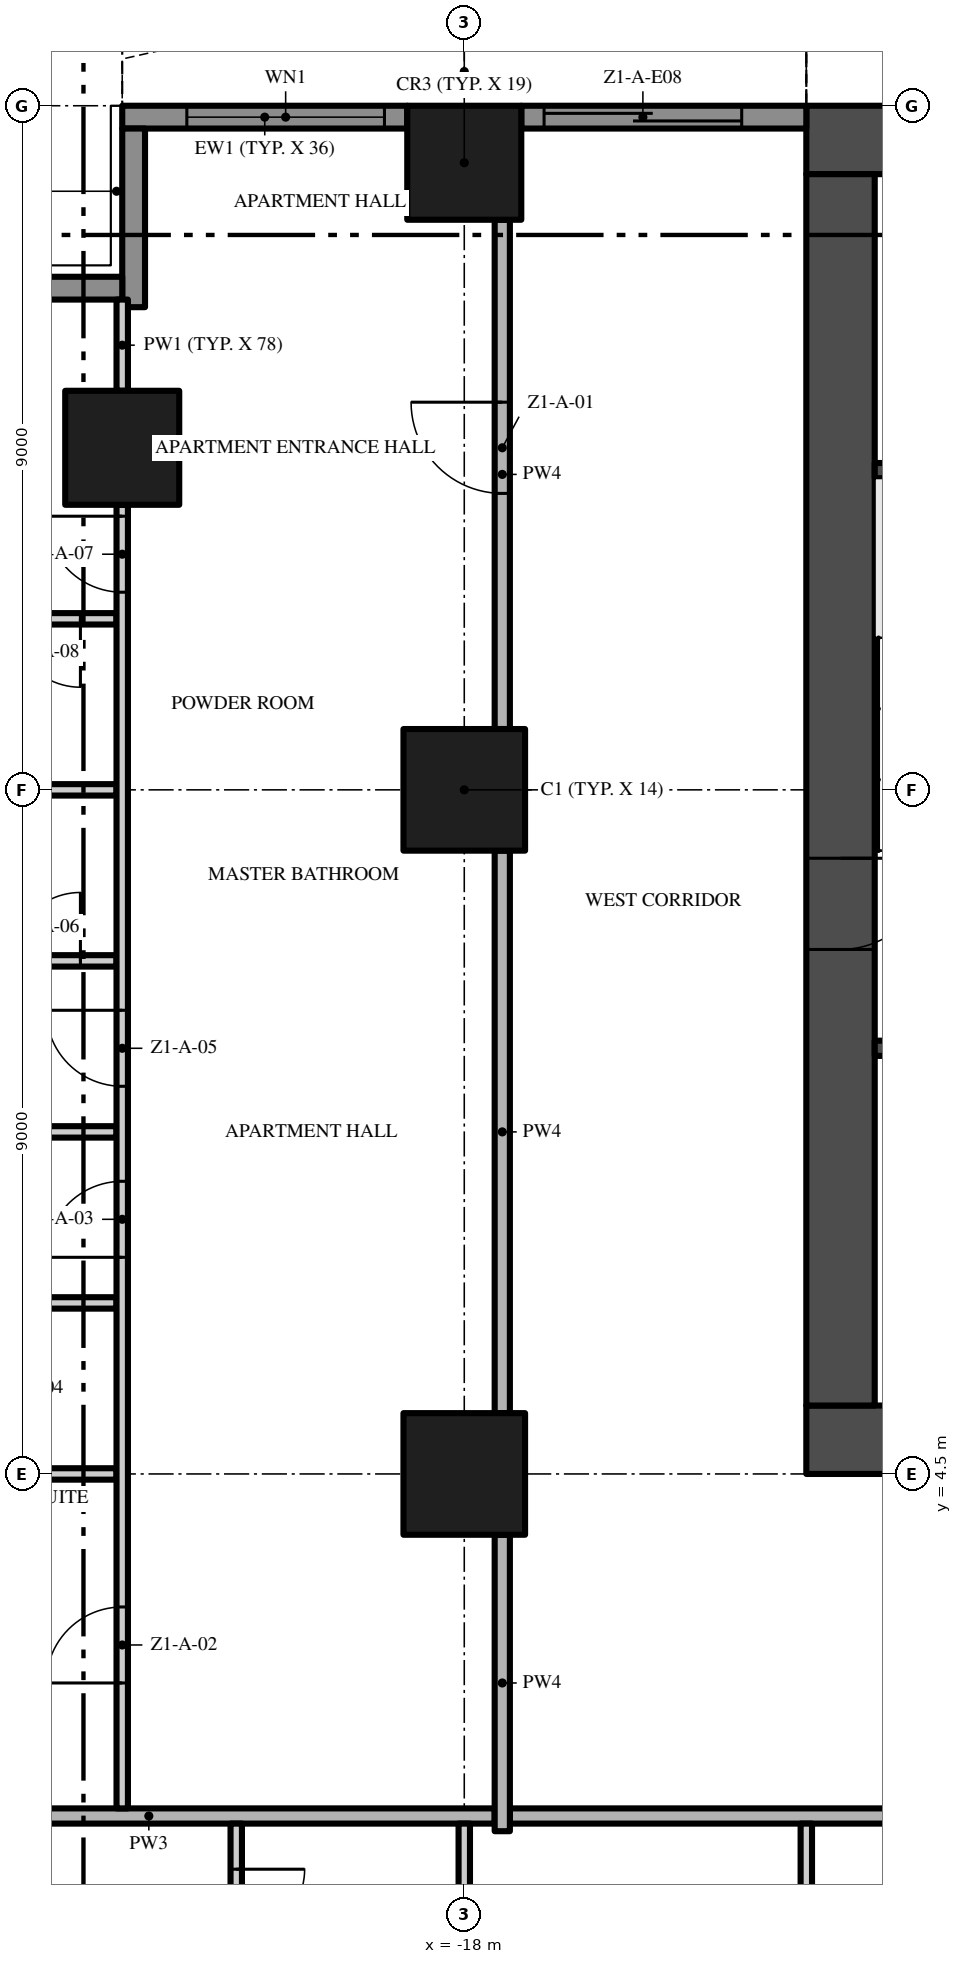
"""IFC4 building model, lengths in metres.
Left out: names, types, materials, properties, quantities, classifications, styles, units other than length and angle.
Written with IfcOpenShell. Run it as: python <this file> out.ifc"""

import sys

from ifc_helpers import new_model, si_unit, direction, frame, frame_2d, origin, origin_2d, place, context, subcontext, project, spatial, polyline, rectangle, outline, extrude, element, fill, save


model = new_model("IFC4")
c1 = context("Model", 3, precision=1e-05, world=origin(), true_north=direction((0.0, 1.0)))
c2 = subcontext(c1, "Body", "Model", "MODEL_VIEW")
j1 = project(units=[si_unit("LENGTHUNIT", "METRE"), si_unit("PLANEANGLEUNIT", "RADIAN")], contexts=[c1])
p1 = place(None, origin())
s1 = spatial("IfcSite", under=j1, at=p1, CompositionType="ELEMENT")
p2 = place(p1, origin())
s2 = spatial("IfcBuilding", under=s1, at=p2, CompositionType="ELEMENT")
p3 = place(p2, frame((0.0, 0.0, 18.8)))
s3 = spatial("IfcBuildingStorey", under=s2, at=p3, CompositionType="ELEMENT", Elevation=18.8)
p4 = place(p3, frame((-13.5, 4.95, -0.3), z_axis=(0.0, 0.0, 1.0), x_axis=(1.0, 0.0, 0.0)))
e1 = element("IfcWall", 1, at=p4, inside=s3, PredefinedType="SHEAR", context=c2, shape_type="SweptSolid", body=[
    extrude(rectangle(XDim=27.0, YDim=0.9, at=frame_2d((13.5, 0.0))), origin(), (0.0, 0.0, 1.0), 3.8),
])
p5 = place(p4, frame((12.0, 0.0, 0.3)))
e2 = element("IfcOpeningElement", 2, at=p5, cuts=e1, PredefinedType="OPENING", context=c2, shape_type="SweptSolid", body=[
    extrude(rectangle(XDim=3.0, YDim=2.4, at=frame_2d((1.5, 1.2))), frame((0.0, 0.46, 0.0), z_axis=(0.0, -1.0, 0.0), x_axis=(1.0, 0.0, 0.0)), (0.0, 0.0, 1.0), 0.92),
])
p6 = place(p4, frame((4.9, 0.0, 0.3)))
e3 = element("IfcOpeningElement", 3, at=p6, cuts=e1, PredefinedType="OPENING", context=c2, shape_type="SweptSolid", body=[
    extrude(rectangle(XDim=1.2, YDim=2.2, at=frame_2d((0.6, 1.1))), frame((0.0, 0.46, 0.0), z_axis=(0.0, -1.0, 0.0), x_axis=(1.0, 0.0, 0.0)), (0.0, 0.0, 1.0), 0.92),
])
p7 = place(p4, frame((20.75, 0.0, 0.3)))
e4 = element("IfcOpeningElement", 4, at=p7, cuts=e1, PredefinedType="OPENING", context=c2, shape_type="SweptSolid", body=[
    extrude(rectangle(XDim=1.5, YDim=2.2, at=frame_2d((0.75, 1.1))), frame((0.0, 0.46, 0.0), z_axis=(0.0, -1.0, 0.0), x_axis=(1.0, 0.0, 0.0)), (0.0, 0.0, 1.0), 0.92),
])
p8 = place(p4, frame((17.4, 0.0, 0.3)))
e5 = element("IfcOpeningElement", 5, at=p8, cuts=e1, PredefinedType="OPENING", context=c2, shape_type="SweptSolid", body=[
    extrude(rectangle(XDim=1.2, YDim=2.2, at=frame_2d((0.6, 1.1))), frame((0.0, 0.46, 0.0), z_axis=(0.0, -1.0, 0.0), x_axis=(1.0, 0.0, 0.0)), (0.0, 0.0, 1.0), 0.92),
])
p9 = place(p3, frame((13.5, 22.05, -0.3), z_axis=(0.0, 0.0, 1.0), x_axis=(-1.0, 0.0, 0.0)))
e6 = element("IfcWall", 6, at=p9, inside=s3, PredefinedType="SHEAR", context=c2, shape_type="SweptSolid", body=[
    extrude(rectangle(XDim=27.0, YDim=0.9, at=frame_2d((13.5, 0.0))), origin(), (0.0, 0.0, 1.0), 3.8),
])
p10 = place(p3, frame((-13.05, 21.6, -0.3), z_axis=(0.0, 0.0, 1.0), x_axis=(0.0, -1.0, 0.0)))
e7 = element("IfcWall", 7, at=p10, inside=s3, PredefinedType="SHEAR", context=c2, shape_type="SweptSolid", body=[
    extrude(rectangle(XDim=16.2, YDim=0.9, at=frame_2d((8.1, 0.0))), origin(), (0.0, 0.0, 1.0), 3.8),
])
p11 = place(p10, frame((9.0, 0.0, 0.3)))
e8 = element("IfcOpeningElement", 8, at=p11, cuts=e7, PredefinedType="OPENING", context=c2, shape_type="SweptSolid", body=[
    extrude(rectangle(XDim=1.2, YDim=2.2, at=frame_2d((0.6, 1.1))), frame((0.0, 0.46, 0.0), z_axis=(0.0, -1.0, 0.0), x_axis=(1.0, 0.0, 0.0)), (0.0, 0.0, 1.0), 0.92),
])
p12 = place(p3, frame((-18.0, 13.5, 0.0), z_axis=(0.0, 0.0, 1.0), x_axis=(1.0, 0.0, 0.0)))
e9 = element("IfcColumn", 9, at=p12, inside=s3, PredefinedType="COLUMN", context=c2, shape_type="SweptSolid", body=[
    extrude(rectangle(XDim=1.6, YDim=1.6, at=origin_2d()), origin(), (0.0, 0.0, 1.0), 3.5),
])
p13 = place(p3, frame((-18.0, 21.75, 0.0), z_axis=(0.0, 0.0, 1.0), x_axis=(1.0, 0.0, 0.0)))
e10 = element("IfcColumn", 10, at=p13, inside=s3, PredefinedType="COLUMN", context=c2, shape_type="SweptSolid", body=[
    extrude(rectangle(XDim=1.5, YDim=1.5, at=origin_2d()), origin(), (0.0, 0.0, 1.0), 3.5),
])
p14 = place(p3, frame((-18.0, 4.5, 0.0), z_axis=(0.0, 0.0, 1.0), x_axis=(1.0, 0.0, 0.0)))
e11 = element("IfcColumn", 11, at=p14, inside=s3, PredefinedType="COLUMN", context=c2, shape_type="SweptSolid", body=[
    extrude(rectangle(XDim=1.6, YDim=1.6, at=origin_2d()), origin(), (0.0, 0.0, 1.0), 3.5),
])
p15 = place(p3, frame((-22.5, 18.0, 0.0), z_axis=(0.0, 0.0, 1.0), x_axis=(1.0, 0.0, 0.0)))
e12 = element("IfcColumn", 12, at=p15, inside=s3, PredefinedType="COLUMN", context=c2, shape_type="SweptSolid", body=[
    extrude(rectangle(XDim=1.5, YDim=1.5, at=origin_2d()), origin(), (0.0, 0.0, 1.0), 3.5),
])
p16 = place(p3, frame((-17.25, 22.35, 0.0), z_axis=(0.0, 0.0, 1.0), x_axis=(1.0, 0.0, 0.0)))
e13 = element("IfcWall", 13, at=p16, inside=s3, PredefinedType="SOLIDWALL", context=c2, shape_type="SweptSolid", body=[
    extrude(rectangle(XDim=3.75, YDim=0.3, at=frame_2d((1.875, 0.0))), origin(), (0.0, 0.0, 1.0), 3.5),
])
p17 = place(p16, frame((0.3, 0.0, 0.0)))
e14 = element("IfcOpeningElement", 14, at=p17, cuts=e13, PredefinedType="OPENING", context=c2, shape_type="SweptSolid", body=[
    extrude(rectangle(XDim=2.6, YDim=2.4, at=frame_2d((1.3, 1.2))), frame((0.0, 0.16, 0.0), z_axis=(0.0, -1.0, 0.0), x_axis=(1.0, 0.0, 0.0)), (0.0, 0.0, 1.0), 0.32),
])
p18 = place(p3, frame((-22.5, 22.35, 0.0), z_axis=(0.0, 0.0, 1.0), x_axis=(1.0, 0.0, 0.0)))
e15 = element("IfcWall", 15, at=p18, inside=s3, PredefinedType="SOLIDWALL", context=c2, shape_type="SweptSolid", body=[
    extrude(rectangle(XDim=3.75, YDim=0.3, at=frame_2d((1.875, 0.0))), origin(), (0.0, 0.0, 1.0), 3.5),
])
p19 = place(p18, frame((0.85, 0.0, 0.45)))
e16 = element("IfcOpeningElement", 16, at=p19, cuts=e15, PredefinedType="OPENING", context=c2, shape_type="SweptSolid", body=[
    extrude(rectangle(XDim=2.6, YDim=2.65, at=frame_2d((1.3, 1.325))), frame((0.0, 0.16, 0.0), z_axis=(0.0, -1.0, 0.0), x_axis=(1.0, 0.0, 0.0)), (0.0, 0.0, 1.0), 0.32),
])
p20 = place(p3, frame((-22.35, 19.85, 0.0), z_axis=(0.0, 0.0, 1.0), x_axis=(0.0, 1.0, 0.0)))
e17 = element("IfcWall", 17, at=p20, inside=s3, PredefinedType="SOLIDWALL", context=c2, shape_type="SweptSolid", body=[
    extrude(rectangle(XDim=2.35, YDim=0.3, at=frame_2d((1.175, 0.0))), origin(), (0.0, 0.0, 1.0), 3.5),
])
p21 = place(p3, frame((-24.75, 20.1, 0.0), z_axis=(0.0, 0.0, 1.0), x_axis=(1.0, 0.0, 0.0)))
e18 = element("IfcWall", 18, at=p21, inside=s3, PredefinedType="SOLIDWALL", context=c2, shape_type="SweptSolid", body=[
    extrude(rectangle(XDim=2.25, YDim=0.3, at=frame_2d((1.125, 0.0))), origin(), (0.0, 0.0, 1.0), 3.5),
])
p22 = place(p3, origin())
e19 = element("IfcWall", 19, at=p22, inside=s3, PredefinedType="USERDEFINED", context=c2, shape_type="SweptSolid", body=[
    extrude(outline(polyline([(-13.5, 25.149), (-15.0, 25.485), (-15.375, 25.5), (-16.5, 25.369), (-18.0, 24.845), (-19.5, 24.112), (-21.0, 23.451), (-22.5, 23.115), (-22.445, 22.871), (-20.921, 23.213), (-19.395, 23.885), (-17.904, 24.614), (-16.444, 25.124), (-15.365, 25.249), (-15.033, 25.236), (-13.555, 24.905), (-13.5, 25.149)])), origin(), (0.0, 0.0, 1.0), 0.9),
])
for number, where, z_axis, x_axis in (
    (20, (-12.6, 10.1, 0.0), (0.0, 0.0, 1.0), (1.0, 0.0, 0.0)),
    (21, (-12.6, 17.7, 0.0), (0.0, 0.0, 1.0), (1.0, 0.0, 0.0)),
):
    element("IfcWall", number, at=place(p3, frame(where, z_axis=z_axis, x_axis=x_axis)), inside=s3, PredefinedType="SHEAR", context=c2, shape_type="SweptSolid", body=[
        extrude(rectangle(XDim=2.95, YDim=0.2, at=frame_2d((1.475, 0.0))), origin(), (0.0, 0.0, 1.0), 3.5),
    ])
p23 = place(p3, frame((-17.4, 0.0, 0.0), z_axis=(0.0, 0.0, 1.0), x_axis=(1.0, 0.0, 0.0)))
e22 = element("IfcWall", 22, at=p23, inside=s3, PredefinedType="PARTITIONING", context=c2, shape_type="SweptSolid", body=[
    extrude(rectangle(XDim=12.8, YDim=0.2, at=frame_2d((6.4, 0.0))), origin(), (0.0, 0.0, 1.0), 3.5),
])
p24 = place(p3, frame((-26.7, 0.0, 0.0), z_axis=(0.0, 0.0, 1.0), x_axis=(1.0, 0.0, 0.0)))
e23 = element("IfcWall", 23, at=p24, inside=s3, PredefinedType="PARTITIONING", context=c2, shape_type="SweptSolid", body=[
    extrude(rectangle(XDim=9.1, YDim=0.2, at=frame_2d((4.55, 0.0))), origin(), (0.0, 0.0, 1.0), 3.5),
])
p25 = place(p3, frame((-25.5, 4.5, 0.0), z_axis=(0.0, 0.0, 1.0), x_axis=(1.0, 0.0, 0.0)))
e24 = element("IfcWall", 24, at=p25, inside=s3, PredefinedType="PARTITIONING", context=c2, shape_type="SweptSolid", body=[
    extrude(rectangle(XDim=2.925, YDim=0.15, at=frame_2d((1.462, 0.0))), origin(), (0.0, 0.0, 1.0), 3.5),
])
p26 = place(p3, frame((-24.45, 6.75, 0.0), z_axis=(0.0, 0.0, 1.0), x_axis=(1.0, 0.0, 0.0)))
e25 = element("IfcWall", 25, at=p26, inside=s3, PredefinedType="PARTITIONING", context=c2, shape_type="SweptSolid", body=[
    extrude(rectangle(XDim=1.875, YDim=0.15, at=frame_2d((0.938, 0.0))), origin(), (0.0, 0.0, 1.0), 3.5),
])
p27 = place(p3, frame((-26.7, 9.0, 0.0), z_axis=(0.0, 0.0, 1.0), x_axis=(1.0, 0.0, 0.0)))
e26 = element("IfcWall", 26, at=p27, inside=s3, PredefinedType="PARTITIONING", context=c2, shape_type="SweptSolid", body=[
    extrude(rectangle(XDim=4.125, YDim=0.15, at=frame_2d((2.062, 0.0))), origin(), (0.0, 0.0, 1.0), 3.5),
])
p28 = place(p3, frame((-24.45, 11.25, 0.0), z_axis=(0.0, 0.0, 1.0), x_axis=(1.0, 0.0, 0.0)))
e27 = element("IfcWall", 27, at=p28, inside=s3, PredefinedType="PARTITIONING", context=c2, shape_type="SweptSolid", body=[
    extrude(rectangle(XDim=1.875, YDim=0.15, at=frame_2d((0.938, 0.0))), origin(), (0.0, 0.0, 1.0), 3.5),
])
p29 = place(p28, frame((0.5, 0.0, 0.0)))
e28 = element("IfcOpeningElement", 28, at=p29, cuts=e27, PredefinedType="OPENING", context=c2, shape_type="SweptSolid", body=[
    extrude(rectangle(XDim=0.9, YDim=2.1, at=frame_2d((0.45, 1.05))), frame((0.0, 0.085, 0.0), z_axis=(0.0, -1.0, 0.0), x_axis=(1.0, 0.0, 0.0)), (0.0, 0.0, 1.0), 0.17),
])
p30 = place(p3, frame((-24.45, 13.5, 0.0), z_axis=(0.0, 0.0, 1.0), x_axis=(1.0, 0.0, 0.0)))
e29 = element("IfcWall", 29, at=p30, inside=s3, PredefinedType="PARTITIONING", context=c2, shape_type="SweptSolid", body=[
    extrude(rectangle(XDim=1.875, YDim=0.15, at=frame_2d((0.938, 0.0))), origin(), (0.0, 0.0, 1.0), 3.5),
])
p31 = place(p3, frame((-22.575, 15.75, 0.0), z_axis=(0.0, 0.0, 1.0), x_axis=(-1.0, 0.0, 0.0)))
e30 = element("IfcWall", 30, at=p31, inside=s3, PredefinedType="PARTITIONING", context=c2, shape_type="SweptSolid", body=[
    extrude(rectangle(XDim=1.875, YDim=0.15, at=frame_2d((0.938, 0.0))), origin(), (0.0, 0.0, 1.0), 3.5),
])
p32 = place(p31, frame((0.475, 0.0, 0.0)))
e31 = element("IfcOpeningElement", 31, at=p32, cuts=e30, PredefinedType="OPENING", context=c2, shape_type="SweptSolid", body=[
    extrude(rectangle(XDim=0.9, YDim=2.1, at=frame_2d((0.45, 1.05))), frame((0.0, 0.085, 0.0), z_axis=(0.0, -1.0, 0.0), x_axis=(1.0, 0.0, 0.0)), (0.0, 0.0, 1.0), 0.17),
])
p33 = place(p3, frame((-22.5, 0.1, 0.0), z_axis=(0.0, 0.0, 1.0), x_axis=(0.0, 1.0, 0.0)))
e32 = element("IfcWall", 32, at=p33, inside=s3, PredefinedType="PARTITIONING", context=c2, shape_type="SweptSolid", body=[
    extrude(rectangle(XDim=17.15, YDim=0.15, at=frame_2d((8.575, 0.0))), origin(), (0.0, 0.0, 1.0), 3.5),
])
p34 = place(p33, frame((1.65, 0.0, 0.0)))
e33 = element("IfcOpeningElement", 33, at=p34, cuts=e32, PredefinedType="OPENING", context=c2, shape_type="SweptSolid", body=[
    extrude(rectangle(XDim=1.0, YDim=2.4, at=frame_2d((0.5, 1.2))), frame((0.0, 0.085, 0.0), z_axis=(0.0, -1.0, 0.0), x_axis=(1.0, 0.0, 0.0)), (0.0, 0.0, 1.0), 0.17),
])
p35 = place(p33, frame((7.25, 0.0, 0.0)))
e34 = element("IfcOpeningElement", 34, at=p35, cuts=e32, PredefinedType="OPENING", context=c2, shape_type="SweptSolid", body=[
    extrude(rectangle(XDim=1.0, YDim=2.4, at=frame_2d((0.5, 1.2))), frame((0.0, 0.085, 0.0), z_axis=(0.0, -1.0, 0.0), x_axis=(1.0, 0.0, 0.0)), (0.0, 0.0, 1.0), 0.17),
])
p36 = place(p33, frame((9.5, 0.0, 0.0)))
e35 = element("IfcOpeningElement", 35, at=p36, cuts=e32, PredefinedType="OPENING", context=c2, shape_type="SweptSolid", body=[
    extrude(rectangle(XDim=1.0, YDim=2.4, at=frame_2d((0.5, 1.2))), frame((0.0, 0.085, 0.0), z_axis=(0.0, -1.0, 0.0), x_axis=(1.0, 0.0, 0.0)), (0.0, 0.0, 1.0), 0.17),
])
p37 = place(p33, frame((16.0, 0.0, 0.0)))
e36 = element("IfcOpeningElement", 36, at=p37, cuts=e32, PredefinedType="OPENING", context=c2, shape_type="SweptSolid", body=[
    extrude(rectangle(XDim=1.0, YDim=2.4, at=frame_2d((0.5, 1.2))), frame((0.0, 0.085, 0.0), z_axis=(0.0, -1.0, 0.0), x_axis=(1.0, 0.0, 0.0)), (0.0, 0.0, 1.0), 0.17),
])
p38 = place(p3, frame((-22.5, 18.75, 0.0), z_axis=(0.0, 0.0, 1.0), x_axis=(0.0, 1.0, 0.0)))
e37 = element("IfcWall", 37, at=p38, inside=s3, PredefinedType="PARTITIONING", context=c2, shape_type="SweptSolid", body=[
    extrude(rectangle(XDim=1.2, YDim=0.15, at=frame_2d((0.6, 0.0))), origin(), (0.0, 0.0, 1.0), 3.5),
])
p39 = place(p3, frame((-21.0, -0.1, 0.0), z_axis=(0.0, 0.0, 1.0), x_axis=(0.0, -1.0, 0.0)))
e38 = element("IfcWall", 38, at=p39, inside=s3, PredefinedType="PARTITIONING", context=c2, shape_type="SweptSolid", body=[
    extrude(rectangle(XDim=2.225, YDim=0.15, at=frame_2d((1.113, 0.0))), origin(), (0.0, 0.0, 1.0), 3.5),
])
p40 = place(p39, frame((0.6, 0.0, 0.0)))
e39 = element("IfcOpeningElement", 39, at=p40, cuts=e38, PredefinedType="OPENING", context=c2, shape_type="SweptSolid", body=[
    extrude(rectangle(XDim=0.9, YDim=2.1, at=frame_2d((0.45, 1.05))), frame((0.0, 0.085, 0.0), z_axis=(0.0, -1.0, 0.0), x_axis=(1.0, 0.0, 0.0)), (0.0, 0.0, 1.0), 0.17),
])
p41 = place(p3, frame((-18.0, -3.7, 0.0), z_axis=(0.0, 0.0, 1.0), x_axis=(0.0, 1.0, 0.0)))
e40 = element("IfcWall", 40, at=p41, inside=s3, PredefinedType="PARTITIONING", context=c2, shape_type="SweptSolid", body=[
    extrude(rectangle(XDim=3.6, YDim=0.15, at=frame_2d((1.8, 0.0))), origin(), (0.0, 0.0, 1.0), 3.5),
])
p42 = place(p3, frame((-17.5, -0.2, 0.0), z_axis=(0.0, 0.0, 1.0), x_axis=(0.0, 1.0, 0.0)))
e41 = element("IfcWall", 41, at=p42, inside=s3, PredefinedType="PARTITIONING", context=c2, shape_type="SweptSolid", body=[
    extrude(rectangle(XDim=3.9, YDim=0.2, at=frame_2d((1.95, 0.0))), origin(), (0.0, 0.0, 1.0), 3.5),
])
p43 = place(p3, frame((-17.5, 5.3, 0.0), z_axis=(0.0, 0.0, 1.0), x_axis=(0.0, 1.0, 0.0)))
e42 = element("IfcWall", 42, at=p43, inside=s3, PredefinedType="PARTITIONING", context=c2, shape_type="SweptSolid", body=[
    extrude(rectangle(XDim=7.4, YDim=0.2, at=frame_2d((3.7, 0.0))), origin(), (0.0, 0.0, 1.0), 3.5),
])
p44 = place(p3, frame((-17.5, 14.3, 0.0), z_axis=(0.0, 0.0, 1.0), x_axis=(0.0, 1.0, 0.0)))
e43 = element("IfcWall", 43, at=p44, inside=s3, PredefinedType="PARTITIONING", context=c2, shape_type="SweptSolid", body=[
    extrude(rectangle(XDim=6.7, YDim=0.2, at=frame_2d((3.35, 0.0))), origin(), (0.0, 0.0, 1.0), 3.5),
])
p45 = place(p44, frame((3.1, 0.0, 0.0)))
e44 = element("IfcOpeningElement", 44, at=p45, cuts=e43, PredefinedType="OPENING", context=c2, shape_type="SweptSolid", body=[
    extrude(rectangle(XDim=1.2, YDim=2.4, at=frame_2d((0.6, 1.2))), frame((0.0, 0.11, 0.0), z_axis=(0.0, -1.0, 0.0), x_axis=(1.0, 0.0, 0.0)), (0.0, 0.0, 1.0), 0.22),
])
p46 = place(p3, frame((-13.5, -9.975, 0.0), z_axis=(0.0, 0.0, 1.0), x_axis=(0.0, 1.0, 0.0)))
e45 = element("IfcWall", 45, at=p46, inside=s3, PredefinedType="PARTITIONING", context=c2, shape_type="SweptSolid", body=[
    extrude(rectangle(XDim=9.875, YDim=0.15, at=frame_2d((4.938, 0.0))), origin(), (0.0, 0.0, 1.0), 3.5),
])
p47 = place(p17, origin())
e46 = element("IfcDoor", 46, at=p47, inside=s3, OperationType="SINGLE_SWING_LEFT", PredefinedType="DOOR", context=c2, shape_type="SweptSolid", body=[
    extrude(rectangle(XDim=2.6, YDim=2.4, at=frame_2d((1.3, 1.2))), frame((0.0, 0.025, 0.0), z_axis=(0.0, -1.0, 0.0), x_axis=(1.0, 0.0, 0.0)), (0.0, 0.0, 1.0), 0.05),
])
fill(e14, e46)
p48 = place(p19, origin())
e47 = element("IfcWindow", 47, at=p48, inside=s3, PartitioningType="SINGLE_PANEL", PredefinedType="WINDOW", context=c2, shape_type="SweptSolid", body=[
    extrude(rectangle(XDim=2.6, YDim=2.65, at=frame_2d((1.3, 1.325))), frame((0.0, 0.03, 0.0), z_axis=(0.0, -1.0, 0.0), x_axis=(1.0, 0.0, 0.0)), (0.0, 0.0, 1.0), 0.06),
])
fill(e16, e47)
p49 = place(p11, frame((1.2, 0.0, 0.0), z_axis=(0.0, 0.0, 1.0), x_axis=(-1.0, 0.0, 0.0)))
e48 = element("IfcDoor", 48, at=p49, inside=s3, OperationType="SINGLE_SWING_RIGHT", PredefinedType="DOOR", context=c2, shape_type="SweptSolid", body=[
    extrude(rectangle(XDim=1.2, YDim=2.2, at=frame_2d((0.6, 1.1))), frame((0.0, 0.025, 0.0), z_axis=(0.0, -1.0, 0.0), x_axis=(1.0, 0.0, 0.0)), (0.0, 0.0, 1.0), 0.05),
])
fill(e8, e48)
p50 = place(p45, origin())
e49 = element("IfcDoor", 49, at=p50, inside=s3, OperationType="SINGLE_SWING_RIGHT", PredefinedType="DOOR", context=c2, shape_type="SweptSolid", body=[
    extrude(rectangle(XDim=1.2, YDim=2.4, at=frame_2d((0.6, 1.2))), frame((0.0, 0.025, 0.0), z_axis=(0.0, -1.0, 0.0), x_axis=(1.0, 0.0, 0.0)), (0.0, 0.0, 1.0), 0.05),
])
fill(e44, e49)
p51 = place(p34, origin())
e50 = element("IfcDoor", 50, at=p51, inside=s3, OperationType="SINGLE_SWING_LEFT", PredefinedType="DOOR", context=c2, shape_type="SweptSolid", body=[
    extrude(rectangle(XDim=1.0, YDim=2.4, at=frame_2d((0.5, 1.2))), frame((0.0, 0.025, 0.0), z_axis=(0.0, -1.0, 0.0), x_axis=(1.0, 0.0, 0.0)), (0.0, 0.0, 1.0), 0.05),
])
fill(e33, e50)
p52 = place(p35, origin())
e51 = element("IfcDoor", 51, at=p52, inside=s3, OperationType="SINGLE_SWING_LEFT", PredefinedType="DOOR", context=c2, shape_type="SweptSolid", body=[
    extrude(rectangle(XDim=1.0, YDim=2.4, at=frame_2d((0.5, 1.2))), frame((0.0, 0.025, 0.0), z_axis=(0.0, -1.0, 0.0), x_axis=(1.0, 0.0, 0.0)), (0.0, 0.0, 1.0), 0.05),
])
fill(e34, e51)
p53 = place(p36, origin())
e52 = element("IfcDoor", 52, at=p53, inside=s3, OperationType="SINGLE_SWING_RIGHT", PredefinedType="DOOR", context=c2, shape_type="SweptSolid", body=[
    extrude(rectangle(XDim=1.0, YDim=2.4, at=frame_2d((0.5, 1.2))), frame((0.0, 0.025, 0.0), z_axis=(0.0, -1.0, 0.0), x_axis=(1.0, 0.0, 0.0)), (0.0, 0.0, 1.0), 0.05),
])
fill(e35, e52)
p54 = place(p29, origin())
e53 = element("IfcDoor", 53, at=p54, inside=s3, OperationType="SINGLE_SWING_RIGHT", PredefinedType="DOOR", context=c2, shape_type="SweptSolid", body=[
    extrude(rectangle(XDim=0.9, YDim=2.1, at=frame_2d((0.45, 1.05))), frame((0.0, 0.025, 0.0), z_axis=(0.0, -1.0, 0.0), x_axis=(1.0, 0.0, 0.0)), (0.0, 0.0, 1.0), 0.05),
])
fill(e28, e53)
p55 = place(p37, origin())
e54 = element("IfcDoor", 54, at=p55, inside=s3, OperationType="SINGLE_SWING_RIGHT", PredefinedType="DOOR", context=c2, shape_type="SweptSolid", body=[
    extrude(rectangle(XDim=1.0, YDim=2.4, at=frame_2d((0.5, 1.2))), frame((0.0, 0.025, 0.0), z_axis=(0.0, -1.0, 0.0), x_axis=(1.0, 0.0, 0.0)), (0.0, 0.0, 1.0), 0.05),
])
fill(e36, e54)
p56 = place(p32, origin())
e55 = element("IfcDoor", 55, at=p56, inside=s3, OperationType="SINGLE_SWING_LEFT", PredefinedType="DOOR", context=c2, shape_type="SweptSolid", body=[
    extrude(rectangle(XDim=0.9, YDim=2.1, at=frame_2d((0.45, 1.05))), frame((0.0, 0.025, 0.0), z_axis=(0.0, -1.0, 0.0), x_axis=(1.0, 0.0, 0.0)), (0.0, 0.0, 1.0), 0.05),
])
fill(e31, e55)
p57 = place(p40, origin())
e56 = element("IfcDoor", 56, at=p57, inside=s3, OperationType="SINGLE_SWING_LEFT", PredefinedType="DOOR", context=c2, shape_type="SweptSolid", body=[
    extrude(rectangle(XDim=0.9, YDim=2.1, at=frame_2d((0.45, 1.05))), frame((0.0, 0.025, 0.0), z_axis=(0.0, -1.0, 0.0), x_axis=(1.0, 0.0, 0.0)), (0.0, 0.0, 1.0), 0.05),
])
fill(e39, e56)
save(model, sys.argv[1])
